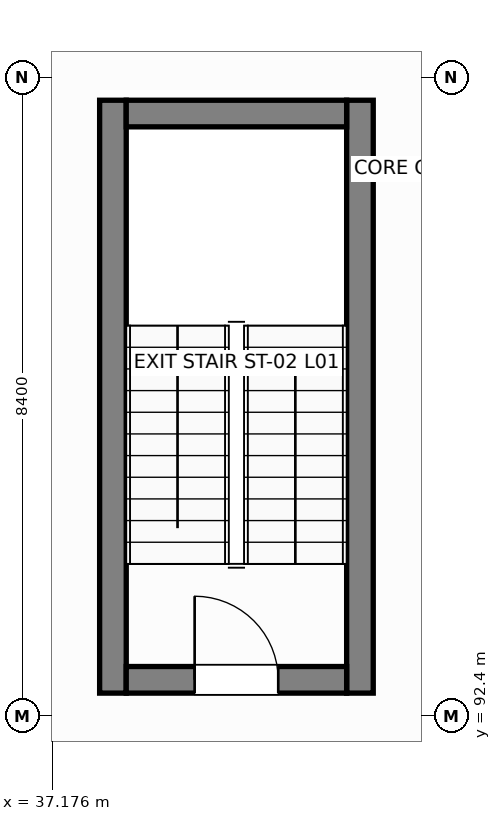
"""IFC4 building model, lengths in metres.
Left out: names, types, materials, properties, quantities, classifications, styles, units other than length and angle.
Written with IfcOpenShell. Run it as: python <this file> out.ifc"""

import sys

from ifc_helpers import new_model, si_unit, direction, frame, frame_2d, origin, place, context, subcontext, project, spatial, rectangle, extrude, element, fill, save


model = new_model("IFC4")
c1 = context("Model", 3, precision=1e-05, world=origin(), true_north=direction((0.0, 1.0)))
c2 = subcontext(c1, "Body", "Model", "MODEL_VIEW")
j1 = project(units=[si_unit("LENGTHUNIT", "METRE"), si_unit("PLANEANGLEUNIT", "RADIAN")], contexts=[c1])
p1 = place(None, origin())
s1 = spatial("IfcSite", under=j1, at=p1, CompositionType="ELEMENT")
p2 = place(p1, origin())
s2 = spatial("IfcBuilding", under=s1, at=p2, CompositionType="ELEMENT")
p3 = place(p2, frame((0.0, 0.0, 4.8)))
s3 = spatial("IfcBuildingStorey", under=s2, at=p3, CompositionType="ELEMENT", Elevation=4.8)
for number, where, z_axis, x_axis in (
    (1, (37.975, 92.7, 0.0), (0.0, 0.0, 1.0), (0.0, 1.0, 0.0)),
    (2, (41.225, 92.7, 0.0), (0.0, 0.0, 1.0), (0.0, 1.0, 0.0)),
):
    element("IfcWall", number, at=place(p3, frame(where, z_axis=z_axis, x_axis=x_axis)), inside=s3, PredefinedType="SHEAR", context=c2, shape_type="SweptSolid", body=[
        extrude(rectangle(XDim=7.8, YDim=0.35, at=frame_2d((3.9, 0.0))), origin(), (0.0, 0.0, 1.0), 3.98),
    ])
p4 = place(p3, frame((38.15, 100.325, 0.0), z_axis=(0.0, 0.0, 1.0), x_axis=(1.0, 0.0, 0.0)))
e3 = element("IfcWall", 3, at=p4, inside=s3, PredefinedType="SHEAR", context=c2, shape_type="SweptSolid", body=[
    extrude(rectangle(XDim=2.9, YDim=0.35, at=frame_2d((1.45, 0.0))), origin(), (0.0, 0.0, 1.0), 3.98),
])
p5 = place(p3, frame((38.15, 92.875, 0.0), z_axis=(0.0, 0.0, 1.0), x_axis=(1.0, 0.0, 0.0)))
e4 = element("IfcWall", 4, at=p5, inside=s3, PredefinedType="SHEAR", context=c2, shape_type="SweptSolid", body=[
    extrude(rectangle(XDim=2.9, YDim=0.35, at=frame_2d((1.45, 0.0))), origin(), (0.0, 0.0, 1.0), 3.98),
])
p6 = place(p5, frame((0.9, 0.0, 0.0)))
e5 = element("IfcOpeningElement", 5, at=p6, cuts=e4, PredefinedType="OPENING", context=c2, shape_type="SweptSolid", body=[
    extrude(rectangle(XDim=1.1, YDim=2.15, at=frame_2d((0.55, 1.075))), frame((0.0, 0.185, 0.0), z_axis=(0.0, -1.0, 0.0), x_axis=(1.0, 0.0, 0.0)), (0.0, 0.0, 1.0), 0.37),
])
p7 = place(p6, origin())
e6 = element("IfcDoor", 6, at=p7, inside=s3, OperationType="SINGLE_SWING_LEFT", PredefinedType="DOOR", context=c2, shape_type="SweptSolid", body=[
    extrude(rectangle(XDim=1.1, YDim=2.15, at=frame_2d((0.55, 1.075))), frame((0.0, 0.025, 0.0), z_axis=(0.0, -1.0, 0.0), x_axis=(1.0, 0.0, 0.0)), (0.0, 0.0, 1.0), 0.05),
])
fill(e5, e6)
save(model, sys.argv[1])
